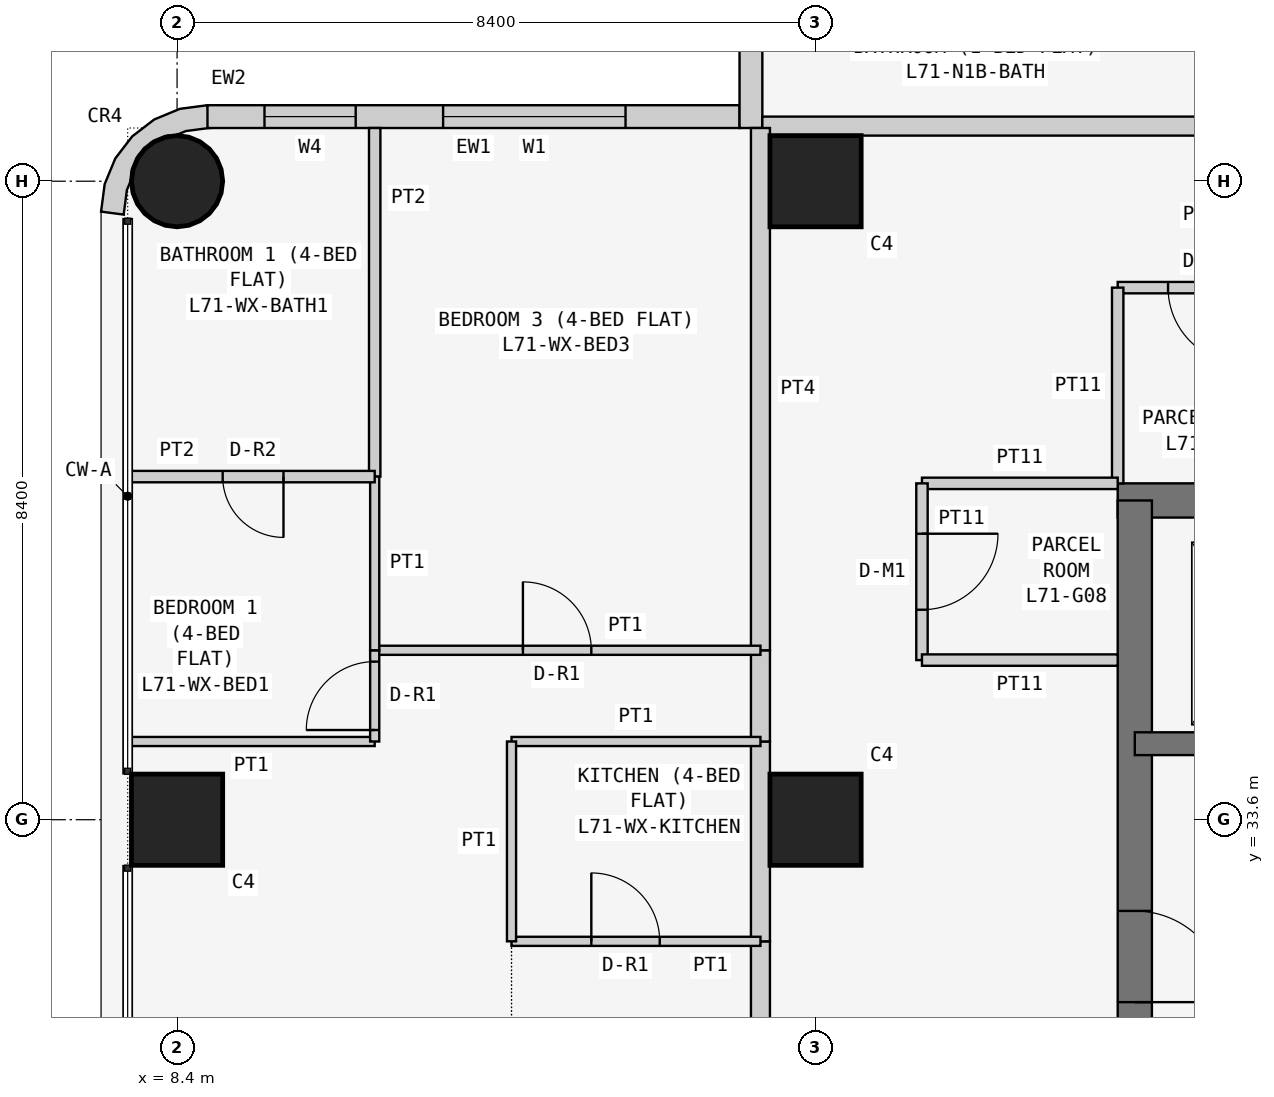
"""IFC4 building model, lengths in metres.
Left out: names, types, materials, properties, quantities, classifications, styles, units other than length and angle.
Written with IfcOpenShell. Run it as: python <this file> out.ifc"""

import sys

from ifc_helpers import new_model, si_unit, direction, frame, frame_2d, origin, origin_2d, place, context, subcontext, project, spatial, polyline, rectangle, circle, outline, extrude, element, fill, save


model = new_model("IFC4")
c1 = context("Model", 3, precision=1e-05, world=origin(), true_north=direction((0.0, 1.0)))
c2 = subcontext(c1, "Body", "Model", "MODEL_VIEW")
j1 = project(units=[si_unit("LENGTHUNIT", "METRE"), si_unit("PLANEANGLEUNIT", "RADIAN")], contexts=[c1])
p1 = place(None, origin())
s1 = spatial("IfcSite", under=j1, at=p1, CompositionType="ELEMENT")
p2 = place(p1, origin())
s2 = spatial("IfcBuilding", under=s1, at=p2, CompositionType="ELEMENT")
p3 = place(p2, frame((0.0, 0.0, 272.1)))
s3 = spatial("IfcBuildingStorey", under=s2, at=p3, CompositionType="ELEMENT", Elevation=272.1)
p4 = place(p3, frame((8.4, 33.6, 0.0), z_axis=(0.0, 0.0, 1.0), x_axis=(1.0, 0.0, 0.0)))
e1 = element("IfcColumn", 1, at=p4, inside=s3, PredefinedType="COLUMN", context=c2, shape_type="SweptSolid", body=[
    extrude(rectangle(XDim=1.2, YDim=1.2, at=origin_2d()), origin(), (0.0, 0.0, 1.0), 3.6),
])
p5 = place(p3, frame((8.4, 42.0, 0.0), z_axis=(0.0, 0.0, 1.0), x_axis=(1.0, 0.0, 0.0)))
e2 = element("IfcColumn", 2, at=p5, inside=s3, PredefinedType="COLUMN", context=c2, shape_type="SweptSolid", body=[
    extrude(circle(Radius=0.6, at=origin_2d()), origin(), (0.0, 0.0, 1.0), 3.6),
])
for number, where, z_axis, x_axis in (
    (3, (16.8, 33.6, 0.0), (0.0, 0.0, 1.0), (1.0, 0.0, 0.0)),
    (4, (16.8, 42.0, 0.0), (0.0, 0.0, 1.0), (1.0, 0.0, 0.0)),
):
    element("IfcColumn", number, at=place(p3, frame(where, z_axis=z_axis, x_axis=x_axis)), inside=s3, PredefinedType="COLUMN", context=c2, shape_type="SweptSolid", body=[
        extrude(rectangle(XDim=1.2, YDim=1.2, at=origin_2d()), origin(), (0.0, 0.0, 1.0), 3.6),
    ])
p6 = place(p3, frame((37.8, 37.8, 0.0), z_axis=(0.0, 0.0, 1.0), x_axis=(-1.0, 0.0, 0.0)))
e5 = element("IfcWall", 5, at=p6, inside=s3, PredefinedType="SHEAR", context=c2, shape_type="SweptSolid", body=[
    extrude(rectangle(XDim=17.025, YDim=0.45, at=frame_2d((8.513, 0.0))), origin(), (0.0, 0.0, 1.0), 3.6),
])
p7 = place(p3, frame((21.0, 37.8, 0.0), z_axis=(0.0, 0.0, 1.0), x_axis=(0.0, -1.0, 0.0)))
e6 = element("IfcWall", 6, at=p7, inside=s3, PredefinedType="SHEAR", context=c2, shape_type="SweptSolid", body=[
    extrude(rectangle(XDim=17.025, YDim=0.45, at=frame_2d((8.513, 0.0))), origin(), (0.0, 0.0, 1.0), 3.6),
])
p8 = place(p7, frame((5.4, 0.0, 0.0)))
e7 = element("IfcOpeningElement", 7, at=p8, cuts=e6, PredefinedType="OPENING", context=c2, shape_type="SweptSolid", body=[
    extrude(rectangle(XDim=1.2, YDim=2.1, at=frame_2d((0.6, 1.05))), frame((0.0, 0.235, 0.0), z_axis=(0.0, -1.0, 0.0), x_axis=(1.0, 0.0, 0.0)), (0.0, 0.0, 1.0), 0.47),
])
p9 = place(p3, frame((21.0, 34.6, 0.0), z_axis=(0.0, 0.0, 1.0), x_axis=(1.0, 0.0, 0.0)))
e8 = element("IfcWall", 8, at=p9, inside=s3, PredefinedType="SHEAR", context=c2, shape_type="SweptSolid", body=[
    extrude(rectangle(XDim=11.2, YDim=0.3, at=frame_2d((5.6, 0.0))), origin(), (0.0, 0.0, 1.0), 3.6),
])
p10 = place(p9, frame((9.35, 0.0, 0.0)))
e9 = element("IfcOpeningElement", 9, at=p10, cuts=e8, PredefinedType="OPENING", context=c2, shape_type="SweptSolid", body=[
    extrude(rectangle(XDim=0.9, YDim=2.1, at=frame_2d((0.45, 1.05))), frame((0.0, 0.16, 0.0), z_axis=(0.0, -1.0, 0.0), x_axis=(1.0, 0.0, 0.0)), (0.0, 0.0, 1.0), 0.32),
])
p11 = place(p9, frame((1.0, 0.0, 0.0)))
e10 = element("IfcOpeningElement", 10, at=p11, cuts=e8, PredefinedType="OPENING", context=c2, shape_type="SweptSolid", body=[
    extrude(rectangle(XDim=1.1, YDim=2.1, at=frame_2d((0.55, 1.05))), frame((0.0, 0.16, 0.0), z_axis=(0.0, -1.0, 0.0), x_axis=(1.0, 0.0, 0.0)), (0.0, 0.0, 1.0), 0.32),
])
p12 = place(p9, frame((3.65, 0.0, 0.0)))
e11 = element("IfcOpeningElement", 11, at=p12, cuts=e8, PredefinedType="OPENING", context=c2, shape_type="SweptSolid", body=[
    extrude(rectangle(XDim=1.1, YDim=2.1, at=frame_2d((0.55, 1.05))), frame((0.0, 0.16, 0.0), z_axis=(0.0, -1.0, 0.0), x_axis=(1.0, 0.0, 0.0)), (0.0, 0.0, 1.0), 0.32),
])
p13 = place(p9, frame((6.35, 0.0, 0.0)))
e12 = element("IfcOpeningElement", 12, at=p13, cuts=e8, PredefinedType="OPENING", context=c2, shape_type="SweptSolid", body=[
    extrude(rectangle(XDim=1.3, YDim=2.1, at=frame_2d((0.65, 1.05))), frame((0.0, 0.16, 0.0), z_axis=(0.0, -1.0, 0.0), x_axis=(1.0, 0.0, 0.0)), (0.0, 0.0, 1.0), 0.32),
])
p14 = place(p3, frame((15.8, 42.85, 0.0), z_axis=(0.0, 0.0, 1.0), x_axis=(-1.0, 0.0, 0.0)))
e13 = element("IfcWall", 13, at=p14, inside=s3, PredefinedType="SOLIDWALL", context=c2, shape_type="SweptSolid", body=[
    extrude(rectangle(XDim=7.0, YDim=0.3, at=frame_2d((3.5, 0.0))), origin(), (0.0, 0.0, 1.0), 3.45),
])
p15 = place(p14, frame((1.5, 0.0, 0.9)))
e14 = element("IfcOpeningElement", 14, at=p15, cuts=e13, PredefinedType="OPENING", context=c2, shape_type="SweptSolid", body=[
    extrude(rectangle(XDim=2.4, YDim=1.5, at=frame_2d((1.2, 0.75))), frame((0.0, 0.16, 0.0), z_axis=(0.0, -1.0, 0.0), x_axis=(1.0, 0.0, 0.0)), (0.0, 0.0, 1.0), 0.32),
])
p16 = place(p14, frame((5.05, 0.0, 0.9)))
e15 = element("IfcOpeningElement", 15, at=p16, cuts=e13, PredefinedType="OPENING", context=c2, shape_type="SweptSolid", body=[
    extrude(rectangle(XDim=1.2, YDim=1.5, at=frame_2d((0.6, 0.75))), frame((0.0, 0.16, 0.0), z_axis=(0.0, -1.0, 0.0), x_axis=(1.0, 0.0, 0.0)), (0.0, 0.0, 1.0), 0.32),
])
p17 = place(p3, frame((15.95, 50.0, 0.0), z_axis=(0.0, 0.0, 1.0), x_axis=(0.0, -1.0, 0.0)))
e16 = element("IfcWall", 16, at=p17, inside=s3, PredefinedType="SOLIDWALL", context=c2, shape_type="SweptSolid", body=[
    extrude(rectangle(XDim=7.3, YDim=0.3, at=frame_2d((3.65, 0.0))), origin(), (0.0, 0.0, 1.0), 3.45),
])
p18 = place(p17, frame((3.1, 0.0, 0.9)))
e17 = element("IfcOpeningElement", 17, at=p18, cuts=e16, PredefinedType="OPENING", context=c2, shape_type="SweptSolid", body=[
    extrude(rectangle(XDim=2.4, YDim=1.5, at=frame_2d((1.2, 0.75))), frame((0.0, 0.16, 0.0), z_axis=(0.0, -1.0, 0.0), x_axis=(1.0, 0.0, 0.0)), (0.0, 0.0, 1.0), 0.32),
])
p19 = place(p17, frame((0.75, 0.0, 0.9)))
e18 = element("IfcOpeningElement", 18, at=p19, cuts=e16, PredefinedType="OPENING", context=c2, shape_type="SweptSolid", body=[
    extrude(rectangle(XDim=1.2, YDim=1.5, at=frame_2d((0.6, 0.75))), frame((0.0, 0.16, 0.0), z_axis=(0.0, -1.0, 0.0), x_axis=(1.0, 0.0, 0.0)), (0.0, 0.0, 1.0), 0.32),
])
p20 = place(p3, frame((8.762, 42.576, 0.0), z_axis=(0.0, 0.0, 1.0), x_axis=(-0.707106781187, 0.707106781187, 0.0)))
e19 = element("IfcWall", 19, at=p20, inside=s3, PredefinedType="SOLIDWALL", context=c2, shape_type="SweptSolid", body=[
    extrude(outline(polyline([(0.233, 0.114), (0.047, -0.129), (0.033, -0.143), (0.273, -0.327), (0.495, -0.037), (0.635, 0.3), (0.683, 0.663), (0.635, 1.025), (0.495, 1.363), (0.273, 1.653), (0.033, 1.469), (0.047, 1.455), (0.233, 1.212), (0.292, 1.069), (0.358, 1.003), (0.449, 0.783), (0.449, 0.543), (0.358, 0.322), (0.292, 0.257), (0.233, 0.114)])), origin(), (0.0, 0.0, 1.0), 3.45),
])
p21 = place(p3, frame((23.1, 40.6, 0.0), z_axis=(0.0, 0.0, 1.0), x_axis=(-1.0, 0.0, 0.0)))
e20 = element("IfcWall", 20, at=p21, inside=s3, PredefinedType="PARTITIONING", context=c2, shape_type="SweptSolid", body=[
    extrude(rectangle(XDim=2.325, YDim=0.15, at=frame_2d((1.163, 0.0))), origin(), (0.0, 0.0, 1.0), 3.45),
])
p22 = place(p21, frame((0.663, 0.0, 0.0)))
e21 = element("IfcOpeningElement", 21, at=p22, cuts=e20, PredefinedType="OPENING", context=c2, shape_type="SweptSolid", body=[
    extrude(rectangle(XDim=1.0, YDim=2.1, at=frame_2d((0.5, 1.05))), frame((0.0, 0.085, 0.0), z_axis=(0.0, -1.0, 0.0), x_axis=(1.0, 0.0, 0.0)), (0.0, 0.0, 1.0), 0.17),
])
p23 = place(p3, frame((20.775, 40.6, 0.0), z_axis=(0.0, 0.0, 1.0), x_axis=(0.0, -1.0, 0.0)))
e22 = element("IfcWall", 22, at=p23, inside=s3, PredefinedType="PARTITIONING", context=c2, shape_type="SweptSolid", body=[
    extrude(rectangle(XDim=2.575, YDim=0.15, at=frame_2d((1.288, 0.0))), origin(), (0.0, 0.0, 1.0), 3.45),
])
p24 = place(p3, frame((20.775, 38.025, 0.0), z_axis=(0.0, 0.0, 1.0), x_axis=(-1.0, 0.0, 0.0)))
e23 = element("IfcWall", 23, at=p24, inside=s3, PredefinedType="PARTITIONING", context=c2, shape_type="SweptSolid", body=[
    extrude(rectangle(XDim=2.575, YDim=0.15, at=frame_2d((1.288, 0.0))), origin(), (0.0, 0.0, 1.0), 3.45),
])
p25 = place(p3, frame((18.2, 38.025, 0.0), z_axis=(0.0, 0.0, 1.0), x_axis=(0.0, -1.0, 0.0)))
e24 = element("IfcWall", 24, at=p25, inside=s3, PredefinedType="PARTITIONING", context=c2, shape_type="SweptSolid", body=[
    extrude(rectangle(XDim=2.325, YDim=0.15, at=frame_2d((1.163, 0.0))), origin(), (0.0, 0.0, 1.0), 3.45),
])
p26 = place(p25, frame((0.663, 0.0, 0.0)))
e25 = element("IfcOpeningElement", 25, at=p26, cuts=e24, PredefinedType="OPENING", context=c2, shape_type="SweptSolid", body=[
    extrude(rectangle(XDim=1.0, YDim=2.1, at=frame_2d((0.5, 1.05))), frame((0.0, 0.085, 0.0), z_axis=(0.0, -1.0, 0.0), x_axis=(1.0, 0.0, 0.0)), (0.0, 0.0, 1.0), 0.17),
])
p27 = place(p3, frame((18.2, 35.7, 0.0), z_axis=(0.0, 0.0, 1.0), x_axis=(1.0, 0.0, 0.0)))
e26 = element("IfcWall", 26, at=p27, inside=s3, PredefinedType="PARTITIONING", context=c2, shape_type="SweptSolid", body=[
    extrude(rectangle(XDim=2.575, YDim=0.15, at=frame_2d((1.288, 0.0))), origin(), (0.0, 0.0, 1.0), 3.45),
])
p28 = place(p3, frame((16.1, 42.725, 0.0), z_axis=(0.0, 0.0, 1.0), x_axis=(1.0, 0.0, 0.0)))
e27 = element("IfcWall", 27, at=p28, inside=s3, PredefinedType="PARTITIONING", context=c2, shape_type="SweptSolid", body=[
    extrude(rectangle(XDim=6.471, YDim=0.25, at=frame_2d((3.235, 0.0))), origin(), (0.0, 0.0, 1.0), 3.45),
])
p29 = place(p3, frame((16.075, 26.8, 0.0), z_axis=(0.0, 0.0, 1.0), x_axis=(0.0, 1.0, 0.0)))
e28 = element("IfcWall", 28, at=p29, inside=s3, PredefinedType="PARTITIONING", context=c2, shape_type="SweptSolid", body=[
    extrude(rectangle(XDim=5.2, YDim=0.25, at=frame_2d((2.6, 0.0))), origin(), (0.0, 0.0, 1.0), 3.45),
])
p30 = place(p29, frame((2.1, 0.0, 0.0)))
e29 = element("IfcOpeningElement", 29, at=p30, cuts=e28, PredefinedType="OPENING", context=c2, shape_type="SweptSolid", body=[
    extrude(rectangle(XDim=1.0, YDim=2.1, at=frame_2d((0.5, 1.05))), frame((0.0, 0.135, 0.0), z_axis=(0.0, -1.0, 0.0), x_axis=(1.0, 0.0, 0.0)), (0.0, 0.0, 1.0), 0.27),
])
p31 = place(p3, frame((16.075, 32.0, 0.0), z_axis=(0.0, 0.0, 1.0), x_axis=(0.0, 1.0, 0.0)))
e30 = element("IfcWall", 30, at=p31, inside=s3, PredefinedType="PARTITIONING", context=c2, shape_type="SweptSolid", body=[
    extrude(rectangle(XDim=2.629, YDim=0.25, at=frame_2d((1.314, 0.0))), origin(), (0.0, 0.0, 1.0), 3.45),
])
p32 = place(p3, frame((16.075, 34.629, 0.0), z_axis=(0.0, 0.0, 1.0), x_axis=(0.0, 1.0, 0.0)))
e31 = element("IfcWall", 31, at=p32, inside=s3, PredefinedType="PARTITIONING", context=c2, shape_type="SweptSolid", body=[
    extrude(rectangle(XDim=1.2, YDim=0.25, at=frame_2d((0.6, 0.0))), origin(), (0.0, 0.0, 1.0), 3.45),
])
p33 = place(p3, frame((16.075, 35.829, 0.0), z_axis=(0.0, 0.0, 1.0), x_axis=(0.0, 1.0, 0.0)))
e32 = element("IfcWall", 32, at=p33, inside=s3, PredefinedType="PARTITIONING", context=c2, shape_type="SweptSolid", body=[
    extrude(rectangle(XDim=6.871, YDim=0.25, at=frame_2d((3.436, 0.0))), origin(), (0.0, 0.0, 1.0), 3.45),
])
p34 = place(p3, frame((16.075, 32.0, 0.0), z_axis=(0.0, 0.0, 1.0), x_axis=(-1.0, 0.0, 0.0)))
e33 = element("IfcWall", 33, at=p34, inside=s3, PredefinedType="PARTITIONING", context=c2, shape_type="SweptSolid", body=[
    extrude(rectangle(XDim=3.275, YDim=0.12, at=frame_2d((1.637, 0.0))), origin(), (0.0, 0.0, 1.0), 3.45),
])
p35 = place(p34, frame((1.325, 0.0, 0.0)))
e34 = element("IfcOpeningElement", 34, at=p35, cuts=e33, PredefinedType="OPENING", context=c2, shape_type="SweptSolid", body=[
    extrude(rectangle(XDim=0.9, YDim=2.1, at=frame_2d((0.45, 1.05))), frame((0.0, 0.07, 0.0), z_axis=(0.0, -1.0, 0.0), x_axis=(1.0, 0.0, 0.0)), (0.0, 0.0, 1.0), 0.14),
])
p36 = place(p3, frame((16.075, 34.629, 0.0), z_axis=(0.0, 0.0, 1.0), x_axis=(-1.0, 0.0, 0.0)))
e35 = element("IfcWall", 35, at=p36, inside=s3, PredefinedType="PARTITIONING", context=c2, shape_type="SweptSolid", body=[
    extrude(rectangle(XDim=3.275, YDim=0.12, at=frame_2d((1.637, 0.0))), origin(), (0.0, 0.0, 1.0), 3.45),
])
p37 = place(p3, frame((12.8, 34.629, 0.0), z_axis=(0.0, 0.0, 1.0), x_axis=(0.0, -1.0, 0.0)))
e36 = element("IfcWall", 36, at=p37, inside=s3, PredefinedType="PARTITIONING", context=c2, shape_type="SweptSolid", body=[
    extrude(rectangle(XDim=2.629, YDim=0.12, at=frame_2d((1.314, 0.0))), origin(), (0.0, 0.0, 1.0), 3.45),
])
p38 = place(p3, frame((11.0, 35.829, 0.0), z_axis=(0.0, 0.0, 1.0), x_axis=(1.0, 0.0, 0.0)))
e37 = element("IfcWall", 37, at=p38, inside=s3, PredefinedType="PARTITIONING", context=c2, shape_type="SweptSolid", body=[
    extrude(rectangle(XDim=5.075, YDim=0.12, at=frame_2d((2.538, 0.0))), origin(), (0.0, 0.0, 1.0), 3.45),
])
p39 = place(p38, frame((1.95, 0.0, 0.0)))
e38 = element("IfcOpeningElement", 38, at=p39, cuts=e37, PredefinedType="OPENING", context=c2, shape_type="SweptSolid", body=[
    extrude(rectangle(XDim=0.9, YDim=2.1, at=frame_2d((0.45, 1.05))), frame((0.0, 0.07, 0.0), z_axis=(0.0, -1.0, 0.0), x_axis=(1.0, 0.0, 0.0)), (0.0, 0.0, 1.0), 0.14),
])
p40 = place(p3, frame((7.75, 34.629, 0.0), z_axis=(0.0, 0.0, 1.0), x_axis=(1.0, 0.0, 0.0)))
e39 = element("IfcWall", 39, at=p40, inside=s3, PredefinedType="PARTITIONING", context=c2, shape_type="SweptSolid", body=[
    extrude(rectangle(XDim=3.25, YDim=0.12, at=frame_2d((1.625, 0.0))), origin(), (0.0, 0.0, 1.0), 3.45),
])
p41 = place(p3, frame((11.0, 34.629, 0.0), z_axis=(0.0, 0.0, 1.0), x_axis=(0.0, 1.0, 0.0)))
e40 = element("IfcWall", 40, at=p41, inside=s3, PredefinedType="PARTITIONING", context=c2, shape_type="SweptSolid", body=[
    extrude(rectangle(XDim=1.2, YDim=0.12, at=frame_2d((0.6, 0.0))), origin(), (0.0, 0.0, 1.0), 3.45),
])
p42 = place(p41, frame((0.151, 0.0, 0.0)))
e41 = element("IfcOpeningElement", 41, at=p42, cuts=e40, PredefinedType="OPENING", context=c2, shape_type="SweptSolid", body=[
    extrude(rectangle(XDim=0.9, YDim=2.1, at=frame_2d((0.45, 1.05))), frame((0.0, 0.07, 0.0), z_axis=(0.0, -1.0, 0.0), x_axis=(1.0, 0.0, 0.0)), (0.0, 0.0, 1.0), 0.14),
])
p43 = place(p3, frame((11.0, 42.7, 0.0), z_axis=(0.0, 0.0, 1.0), x_axis=(0.0, -1.0, 0.0)))
e42 = element("IfcWall", 42, at=p43, inside=s3, PredefinedType="PARTITIONING", context=c2, shape_type="SweptSolid", body=[
    extrude(rectangle(XDim=4.586, YDim=0.15, at=frame_2d((2.293, 0.0))), origin(), (0.0, 0.0, 1.0), 3.45),
])
p44 = place(p3, frame((11.0, 38.114, 0.0), z_axis=(0.0, 0.0, 1.0), x_axis=(0.0, -1.0, 0.0)))
e43 = element("IfcWall", 43, at=p44, inside=s3, PredefinedType="PARTITIONING", context=c2, shape_type="SweptSolid", body=[
    extrude(rectangle(XDim=2.285, YDim=0.12, at=frame_2d((1.143, 0.0))), origin(), (0.0, 0.0, 1.0), 3.45),
])
p45 = place(p3, frame((7.75, 38.114, 0.0), z_axis=(0.0, 0.0, 1.0), x_axis=(1.0, 0.0, 0.0)))
e44 = element("IfcWall", 44, at=p45, inside=s3, PredefinedType="PARTITIONING", context=c2, shape_type="SweptSolid", body=[
    extrude(rectangle(XDim=3.25, YDim=0.15, at=frame_2d((1.625, 0.0))), origin(), (0.0, 0.0, 1.0), 3.45),
])
p46 = place(p45, frame((1.25, 0.0, 0.0)))
e45 = element("IfcOpeningElement", 45, at=p46, cuts=e44, PredefinedType="OPENING", context=c2, shape_type="SweptSolid", body=[
    extrude(rectangle(XDim=0.8, YDim=2.1, at=frame_2d((0.4, 1.05))), frame((0.0, 0.085, 0.0), z_axis=(0.0, -1.0, 0.0), x_axis=(1.0, 0.0, 0.0)), (0.0, 0.0, 1.0), 0.17),
])
p47 = place(p15, origin())
e46 = element("IfcWindow", 46, at=p47, inside=s3, PartitioningType="SINGLE_PANEL", PredefinedType="WINDOW", context=c2, shape_type="SweptSolid", body=[
    extrude(rectangle(XDim=2.4, YDim=1.5, at=frame_2d((1.2, 0.75))), frame((0.0, 0.03, 0.0), z_axis=(0.0, -1.0, 0.0), x_axis=(1.0, 0.0, 0.0)), (0.0, 0.0, 1.0), 0.06),
])
fill(e14, e46)
p48 = place(p16, origin())
e47 = element("IfcWindow", 47, at=p48, inside=s3, PartitioningType="SINGLE_PANEL", PredefinedType="WINDOW", context=c2, shape_type="SweptSolid", body=[
    extrude(rectangle(XDim=1.2, YDim=1.5, at=frame_2d((0.6, 0.75))), frame((0.0, 0.03, 0.0), z_axis=(0.0, -1.0, 0.0), x_axis=(1.0, 0.0, 0.0)), (0.0, 0.0, 1.0), 0.06),
])
fill(e15, e47)
p49 = place(p22, origin())
e48 = element("IfcDoor", 48, at=p49, inside=s3, OperationType="SINGLE_SWING_LEFT", PredefinedType="DOOR", context=c2, shape_type="SweptSolid", body=[
    extrude(rectangle(XDim=1.0, YDim=2.1, at=frame_2d((0.5, 1.05))), frame((0.0, 0.025, 0.0), z_axis=(0.0, -1.0, 0.0), x_axis=(1.0, 0.0, 0.0)), (0.0, 0.0, 1.0), 0.05),
])
fill(e21, e48)
p50 = place(p26, origin())
e49 = element("IfcDoor", 49, at=p50, inside=s3, OperationType="SINGLE_SWING_LEFT", PredefinedType="DOOR", context=c2, shape_type="SweptSolid", body=[
    extrude(rectangle(XDim=1.0, YDim=2.1, at=frame_2d((0.5, 1.05))), frame((0.0, 0.025, 0.0), z_axis=(0.0, -1.0, 0.0), x_axis=(1.0, 0.0, 0.0)), (0.0, 0.0, 1.0), 0.05),
])
fill(e25, e49)
p51 = place(p35, frame((0.9, 0.0, 0.0), z_axis=(0.0, 0.0, 1.0), x_axis=(-1.0, 0.0, 0.0)))
e50 = element("IfcDoor", 50, at=p51, inside=s3, OperationType="SINGLE_SWING_LEFT", PredefinedType="DOOR", context=c2, shape_type="SweptSolid", body=[
    extrude(rectangle(XDim=0.9, YDim=2.1, at=frame_2d((0.45, 1.05))), frame((0.0, 0.025, 0.0), z_axis=(0.0, -1.0, 0.0), x_axis=(1.0, 0.0, 0.0)), (0.0, 0.0, 1.0), 0.05),
])
fill(e34, e50)
p52 = place(p39, origin())
e51 = element("IfcDoor", 51, at=p52, inside=s3, OperationType="SINGLE_SWING_LEFT", PredefinedType="DOOR", context=c2, shape_type="SweptSolid", body=[
    extrude(rectangle(XDim=0.9, YDim=2.1, at=frame_2d((0.45, 1.05))), frame((0.0, 0.025, 0.0), z_axis=(0.0, -1.0, 0.0), x_axis=(1.0, 0.0, 0.0)), (0.0, 0.0, 1.0), 0.05),
])
fill(e38, e51)
p53 = place(p42, origin())
e52 = element("IfcDoor", 52, at=p53, inside=s3, OperationType="SINGLE_SWING_LEFT", PredefinedType="DOOR", context=c2, shape_type="SweptSolid", body=[
    extrude(rectangle(XDim=0.9, YDim=2.1, at=frame_2d((0.45, 1.05))), frame((0.0, 0.025, 0.0), z_axis=(0.0, -1.0, 0.0), x_axis=(1.0, 0.0, 0.0)), (0.0, 0.0, 1.0), 0.05),
])
fill(e41, e52)
p54 = place(p46, frame((0.8, 0.0, 0.0), z_axis=(0.0, 0.0, 1.0), x_axis=(-1.0, 0.0, 0.0)))
e53 = element("IfcDoor", 53, at=p54, inside=s3, OperationType="SINGLE_SWING_LEFT", PredefinedType="DOOR", context=c2, shape_type="SweptSolid", body=[
    extrude(rectangle(XDim=0.8, YDim=2.1, at=frame_2d((0.4, 1.05))), frame((0.0, 0.025, 0.0), z_axis=(0.0, -1.0, 0.0), x_axis=(1.0, 0.0, 0.0)), (0.0, 0.0, 1.0), 0.05),
])
fill(e45, e53)
p55 = place(p8, origin())
e54 = element("IfcDoor", 54, at=p55, inside=s3, OperationType="SINGLE_SWING_RIGHT", PredefinedType="DOOR", context=c2, shape_type="SweptSolid", body=[
    extrude(rectangle(XDim=1.2, YDim=2.1, at=frame_2d((0.6, 1.05))), frame((0.0, 0.025, 0.0), z_axis=(0.0, -1.0, 0.0), x_axis=(1.0, 0.0, 0.0)), (0.0, 0.0, 1.0), 0.05),
])
fill(e7, e54)
save(model, sys.argv[1])
